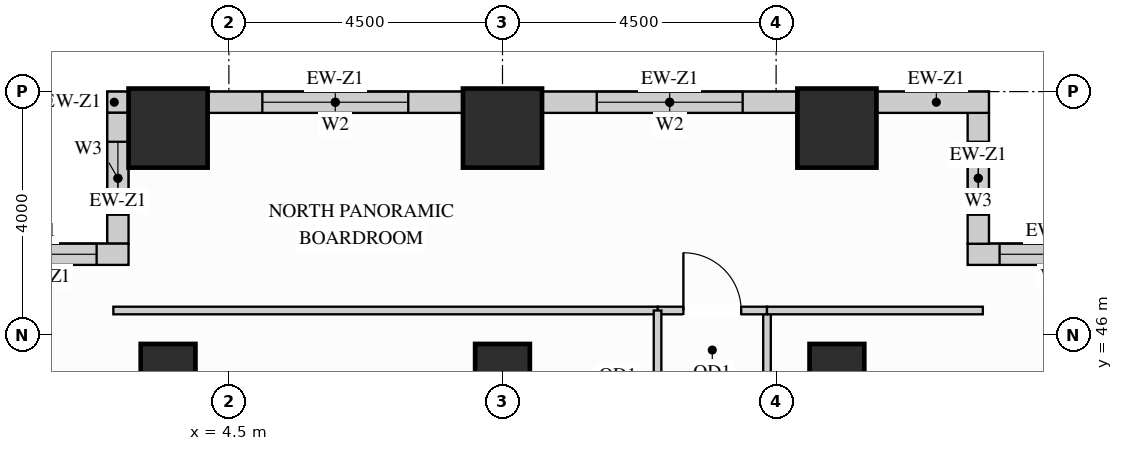
"""IFC4 building model, lengths in metres.
Left out: names, types, materials, properties, quantities, classifications, styles, units other than length and angle.
Written with IfcOpenShell. Run it as: python <this file> out.ifc"""

import sys

from ifc_helpers import new_model, si_unit, direction, frame, frame_2d, origin, origin_2d, place, context, subcontext, project, spatial, rectangle, extrude, source, transform, mapped, element, fill, save


model = new_model("IFC4")
c1 = context("Model", 3, precision=1e-05, world=origin(), true_north=direction((0.0, 1.0)))
c2 = subcontext(c1, "Body", "Model", "MODEL_VIEW")
j1 = project(units=[si_unit("LENGTHUNIT", "METRE"), si_unit("PLANEANGLEUNIT", "RADIAN")], contexts=[c1])
p1 = place(None, origin())
s1 = spatial("IfcSite", under=j1, at=p1, CompositionType="ELEMENT")
p2 = place(p1, origin())
s2 = spatial("IfcBuilding", under=s1, at=p2, CompositionType="ELEMENT")
p3 = place(p2, frame((0.0, 0.0, 47.7)))
s3 = spatial("IfcBuildingStorey", under=s2, at=p3, CompositionType="ELEMENT", Elevation=47.7)
m1 = source(origin(), c2, "Body", "SweptSolid", [
    extrude(rectangle(XDim=0.9, YDim=0.9, at=origin_2d()), origin(), (0.0, 0.0, 1.0), 3.38),
])
for number, where, z_axis, x_axis in (
    (1, (14.5, 45.4, 0.0), (0.0, 0.0, 1.0), (1.0, 0.0, 0.0)),
    (2, (3.5, 45.4, 0.0), (0.0, 0.0, 1.0), (1.0, 0.0, 0.0)),
    (3, (9.0, 45.4, 0.0), (0.0, 0.0, 1.0), (1.0, 0.0, 0.0)),
):
    element("IfcColumn", number, at=place(p3, frame(where, z_axis=z_axis, x_axis=x_axis)), inside=s3, PredefinedType="COLUMN", context=c2, shape_type="MappedRepresentation", body=[
        mapped(m1, transform((0.0, 0.0, 0.0), x_axis=(1.0, 0.0, 0.0), y_axis=(0.0, 1.0, 0.0), z_axis=(0.0, 0.0, 1.0))),
    ])
m2 = source(origin(), c2, "Body", "SweptSolid", [
    extrude(rectangle(XDim=1.3, YDim=1.3, at=origin_2d()), origin(), (0.0, 0.0, 1.0), 3.38),
])
for number, where, z_axis, x_axis in (
    (4, (14.5, 49.4, 0.0), (0.0, 0.0, 1.0), (1.0, 0.0, 0.0)),
    (5, (3.5, 49.4, 0.0), (0.0, 0.0, 1.0), (1.0, 0.0, 0.0)),
    (6, (9.0, 49.4, 0.0), (0.0, 0.0, 1.0), (1.0, 0.0, 0.0)),
):
    element("IfcColumn", number, at=place(p3, frame(where, z_axis=z_axis, x_axis=x_axis)), inside=s3, PredefinedType="COLUMN", context=c2, shape_type="MappedRepresentation", body=[
        mapped(m2, transform((0.0, 0.0, 0.0), x_axis=(1.0, 0.0, 0.0), y_axis=(0.0, 1.0, 0.0), z_axis=(0.0, 0.0, 1.0))),
    ])
p4 = place(p3, frame((19.5, 47.325, 0.0), z_axis=(0.0, 0.0, 1.0), x_axis=(-1.0, 0.0, 0.0)))
e7 = element("IfcWall", 7, at=p4, inside=s3, PredefinedType="SOLIDWALL", context=c2, shape_type="SweptSolid", body=[
    extrude(rectangle(XDim=2.85, YDim=0.35, at=frame_2d((1.425, 0.0))), origin(), (0.0, 0.0, 1.0), 3.365),
])
p5 = place(p4, frame((0.525, 0.0, 0.78)))
e8 = element("IfcOpeningElement", 8, at=p5, cuts=e7, PredefinedType="OPENING", context=c2, shape_type="SweptSolid", body=[
    extrude(rectangle(XDim=1.8, YDim=2.1, at=frame_2d((0.9, 1.05))), frame((0.0, 0.185, 0.0), z_axis=(0.0, -1.0, 0.0), x_axis=(1.0, 0.0, 0.0)), (0.0, 0.0, 1.0), 0.37),
])
p6 = place(p3, frame((16.825, 47.498, 0.0), z_axis=(0.0, 0.0, 1.0), x_axis=(0.0, 1.0, 0.0)))
e9 = element("IfcWall", 9, at=p6, inside=s3, PredefinedType="SOLIDWALL", context=c2, shape_type="SweptSolid", body=[
    extrude(rectangle(XDim=2.154, YDim=0.35, at=frame_2d((1.077, 0.0))), origin(), (0.0, 0.0, 1.0), 3.365),
])
p7 = place(p6, frame((0.477, 0.0, 0.78)))
e10 = element("IfcOpeningElement", 10, at=p7, cuts=e9, PredefinedType="OPENING", context=c2, shape_type="SweptSolid", body=[
    extrude(rectangle(XDim=1.2, YDim=2.1, at=frame_2d((0.6, 1.05))), frame((0.0, 0.185, 0.0), z_axis=(0.0, -1.0, 0.0), x_axis=(1.0, 0.0, 0.0)), (0.0, 0.0, 1.0), 0.37),
])
m3 = source(origin(), c2, "Body", "SweptSolid", [
    extrude(rectangle(XDim=1.852, YDim=0.35, at=frame_2d((0.926, 0.0))), origin(), (0.0, 0.0, 1.0), 3.365),
])
p8 = place(p3, frame((17.0, 49.825, 0.0), z_axis=(0.0, 0.0, 1.0), x_axis=(-1.0, 0.0, 0.0)))
e11 = element("IfcWall", 11, at=p8, inside=s3, PredefinedType="SOLIDWALL", context=c2, shape_type="MappedRepresentation", body=[
    mapped(m3, transform((0.0, 0.0, 0.0), x_axis=(1.0, 0.0, 0.0), y_axis=(0.0, 1.0, 0.0), z_axis=(0.0, 0.0, 1.0))),
])
p9 = place(p3, frame((13.852, 49.825, 0.0), z_axis=(0.0, 0.0, 1.0), x_axis=(-1.0, 0.0, 0.0)))
e12 = element("IfcWall", 12, at=p9, inside=s3, PredefinedType="SOLIDWALL", context=c2, shape_type="SweptSolid", body=[
    extrude(rectangle(XDim=4.204, YDim=0.35, at=frame_2d((2.102, 0.0))), origin(), (0.0, 0.0, 1.0), 2.51),
])
p10 = place(p9, frame((0.902, 0.0, 0.78)))
e13 = element("IfcOpeningElement", 13, at=p10, cuts=e12, PredefinedType="OPENING", context=c2, shape_type="SweptSolid", body=[
    extrude(rectangle(XDim=2.4, YDim=1.55, at=frame_2d((1.2, 0.775))), frame((0.0, 0.185, 0.0), z_axis=(0.0, -1.0, 0.0), x_axis=(1.0, 0.0, 0.0)), (0.0, 0.0, 1.0), 0.37),
])
p11 = place(p3, frame((8.352, 49.825, 0.0), z_axis=(0.0, 0.0, 1.0), x_axis=(-1.0, 0.0, 0.0)))
e14 = element("IfcWall", 14, at=p11, inside=s3, PredefinedType="SOLIDWALL", context=c2, shape_type="SweptSolid", body=[
    extrude(rectangle(XDim=4.204, YDim=0.35, at=frame_2d((2.102, 0.0))), origin(), (0.0, 0.0, 1.0), 2.51),
])
p12 = place(p11, frame((0.902, 0.0, 0.78)))
e15 = element("IfcOpeningElement", 15, at=p12, cuts=e14, PredefinedType="OPENING", context=c2, shape_type="SweptSolid", body=[
    extrude(rectangle(XDim=2.4, YDim=1.55, at=frame_2d((1.2, 0.775))), frame((0.0, 0.185, 0.0), z_axis=(0.0, -1.0, 0.0), x_axis=(1.0, 0.0, 0.0)), (0.0, 0.0, 1.0), 0.37),
])
m4 = source(origin(), c2, "Body", "SweptSolid", [
    extrude(rectangle(XDim=0.352, YDim=0.35, at=frame_2d((0.176, 0.0))), origin(), (0.0, 0.0, 1.0), 3.365),
])
p13 = place(p3, frame((2.852, 49.825, 0.0), z_axis=(0.0, 0.0, 1.0), x_axis=(-1.0, 0.0, 0.0)))
e16 = element("IfcWall", 16, at=p13, inside=s3, PredefinedType="SOLIDWALL", context=c2, shape_type="MappedRepresentation", body=[
    mapped(m4, transform((0.0, 0.0, 0.0), x_axis=(1.0, 0.0, 0.0), y_axis=(0.0, 1.0, 0.0), z_axis=(0.0, 0.0, 1.0))),
])
p14 = place(p3, frame((2.675, 49.652, 0.0), z_axis=(0.0, 0.0, 1.0), x_axis=(0.0, -1.0, 0.0)))
e17 = element("IfcWall", 17, at=p14, inside=s3, PredefinedType="SOLIDWALL", context=c2, shape_type="SweptSolid", body=[
    extrude(rectangle(XDim=2.154, YDim=0.35, at=frame_2d((1.077, 0.0))), origin(), (0.0, 0.0, 1.0), 3.365),
])
p15 = place(p14, frame((0.477, 0.0, 0.78)))
e18 = element("IfcOpeningElement", 18, at=p15, cuts=e17, PredefinedType="OPENING", context=c2, shape_type="SweptSolid", body=[
    extrude(rectangle(XDim=1.2, YDim=2.1, at=frame_2d((0.6, 1.05))), frame((0.0, 0.185, 0.0), z_axis=(0.0, -1.0, 0.0), x_axis=(1.0, 0.0, 0.0)), (0.0, 0.0, 1.0), 0.37),
])
p16 = place(p3, frame((2.85, 47.325, 0.0), z_axis=(0.0, 0.0, 1.0), x_axis=(-1.0, 0.0, 0.0)))
e19 = element("IfcWall", 19, at=p16, inside=s3, PredefinedType="SOLIDWALL", context=c2, shape_type="SweptSolid", body=[
    extrude(rectangle(XDim=2.85, YDim=0.35, at=frame_2d((1.425, 0.0))), origin(), (0.0, 0.0, 1.0), 3.365),
])
p17 = place(p16, frame((0.525, 0.0, 0.78)))
e20 = element("IfcOpeningElement", 20, at=p17, cuts=e19, PredefinedType="OPENING", context=c2, shape_type="SweptSolid", body=[
    extrude(rectangle(XDim=1.8, YDim=2.1, at=frame_2d((0.9, 1.05))), frame((0.0, 0.185, 0.0), z_axis=(0.0, -1.0, 0.0), x_axis=(1.0, 0.0, 0.0)), (0.0, 0.0, 1.0), 0.37),
])
p18 = place(p3, frame((13.35, 39.752, 0.0), z_axis=(0.0, 0.0, 1.0), x_axis=(0.0, 1.0, 0.0)))
e21 = element("IfcWall", 21, at=p18, inside=s3, PredefinedType="PARTITIONING", context=c2, shape_type="SweptSolid", body=[
    extrude(rectangle(XDim=6.648, YDim=0.125, at=frame_2d((3.324, 0.0))), origin(), (0.0, 0.0, 1.0), 3.365),
])
p19 = place(p18, frame((2.849, 0.0, 0.0)))
e22 = element("IfcOpeningElement", 22, at=p19, cuts=e21, PredefinedType="OPENING", context=c2, shape_type="SweptSolid", body=[
    extrude(rectangle(XDim=0.95, YDim=2.15, at=frame_2d((0.475, 1.075))), frame((0.0, 0.073, 0.0), z_axis=(0.0, -1.0, 0.0), x_axis=(1.0, 0.0, 0.0)), (0.0, 0.0, 1.0), 0.145),
])
p20 = place(p3, frame((11.55, 46.4, 0.0), z_axis=(0.0, 0.0, 1.0), x_axis=(1.0, 0.0, 0.0)))
e23 = element("IfcWall", 23, at=p20, inside=s3, PredefinedType="PARTITIONING", context=c2, shape_type="SweptSolid", body=[
    extrude(rectangle(XDim=1.8, YDim=0.125, at=frame_2d((0.9, 0.0))), origin(), (0.0, 0.0, 1.0), 3.365),
])
p21 = place(p20, frame((0.425, 0.0, 0.0)))
e24 = element("IfcOpeningElement", 24, at=p21, cuts=e23, PredefinedType="OPENING", context=c2, shape_type="SweptSolid", body=[
    extrude(rectangle(XDim=0.95, YDim=2.15, at=frame_2d((0.475, 1.075))), frame((0.0, 0.073, 0.0), z_axis=(0.0, -1.0, 0.0), x_axis=(1.0, 0.0, 0.0)), (0.0, 0.0, 1.0), 0.145),
])
m5 = source(origin(), c2, "Body", "SweptSolid", [
    extrude(rectangle(XDim=3.55, YDim=0.125, at=frame_2d((1.775, 0.0))), origin(), (0.0, 0.0, 1.0), 3.365),
])
p22 = place(p3, frame((13.35, 46.4, 0.0), z_axis=(0.0, 0.0, 1.0), x_axis=(1.0, 0.0, 0.0)))
e25 = element("IfcWall", 25, at=p22, inside=s3, PredefinedType="PARTITIONING", context=c2, shape_type="MappedRepresentation", body=[
    mapped(m5, transform((0.0, 0.0, 0.0), x_axis=(1.0, 0.0, 0.0), y_axis=(0.0, 1.0, 0.0), z_axis=(0.0, 0.0, 1.0))),
])
m6 = source(origin(), c2, "Body", "SweptSolid", [
    extrude(rectangle(XDim=8.95, YDim=0.125, at=frame_2d((4.475, 0.0))), origin(), (0.0, 0.0, 1.0), 3.365),
])
p23 = place(p3, frame((2.6, 46.4, 0.0), z_axis=(0.0, 0.0, 1.0), x_axis=(1.0, 0.0, 0.0)))
e26 = element("IfcWall", 26, at=p23, inside=s3, PredefinedType="PARTITIONING", context=c2, shape_type="MappedRepresentation", body=[
    mapped(m6, transform((0.0, 0.0, 0.0), x_axis=(1.0, 0.0, 0.0), y_axis=(0.0, 1.0, 0.0), z_axis=(0.0, 0.0, 1.0))),
])
p24 = place(p3, frame((11.55, 42.245, 0.0), z_axis=(0.0, 0.0, 1.0), x_axis=(0.0, 1.0, 0.0)))
e27 = element("IfcWall", 27, at=p24, inside=s3, PredefinedType="PARTITIONING", context=c2, shape_type="SweptSolid", body=[
    extrude(rectangle(XDim=4.155, YDim=0.125, at=frame_2d((2.077, 0.0))), origin(), (0.0, 0.0, 1.0), 3.365),
])
p25 = place(p24, frame((1.603, 0.0, 0.0)))
e28 = element("IfcOpeningElement", 28, at=p25, cuts=e27, PredefinedType="OPENING", context=c2, shape_type="SweptSolid", body=[
    extrude(rectangle(XDim=0.95, YDim=2.15, at=frame_2d((0.475, 1.075))), frame((0.0, 0.073, 0.0), z_axis=(0.0, -1.0, 0.0), x_axis=(1.0, 0.0, 0.0)), (0.0, 0.0, 1.0), 0.145),
])
m7 = source(origin(), c2, "Body", "SweptSolid", [
    extrude(rectangle(XDim=0.95, YDim=2.15, at=frame_2d((0.475, 1.075))), frame((0.0, 0.025, 0.0), z_axis=(0.0, -1.0, 0.0), x_axis=(1.0, 0.0, 0.0)), (0.0, 0.0, 1.0), 0.05),
])
p26 = place(p21, origin())
e29 = element("IfcDoor", 29, at=p26, inside=s3, OperationType="SINGLE_SWING_LEFT", PredefinedType="DOOR", context=c2, shape_type="MappedRepresentation", body=[
    mapped(m7, transform((0.0, 0.0, 0.0), x_axis=(1.0, 0.0, 0.0), y_axis=(0.0, 1.0, 0.0), z_axis=(0.0, 0.0, 1.0))),
])
fill(e24, e29)
m8 = source(origin(), c2, "Body", "SweptSolid", [
    extrude(rectangle(XDim=1.8, YDim=2.1, at=frame_2d((0.9, 1.05))), frame((0.0, 0.03, 0.0), z_axis=(0.0, -1.0, 0.0), x_axis=(1.0, 0.0, 0.0)), (0.0, 0.0, 1.0), 0.06),
])
p27 = place(p5, origin())
e30 = element("IfcWindow", 30, at=p27, inside=s3, PartitioningType="SINGLE_PANEL", PredefinedType="WINDOW", context=c2, shape_type="MappedRepresentation", body=[
    mapped(m8, transform((0.0, 0.0, 0.0), x_axis=(1.0, 0.0, 0.0), y_axis=(0.0, 1.0, 0.0), z_axis=(0.0, 0.0, 1.0))),
])
fill(e8, e30)
p28 = place(p17, origin())
e31 = element("IfcWindow", 31, at=p28, inside=s3, PartitioningType="SINGLE_PANEL", PredefinedType="WINDOW", context=c2, shape_type="MappedRepresentation", body=[
    mapped(m8, transform((0.0, 0.0, 0.0), x_axis=(1.0, 0.0, 0.0), y_axis=(0.0, 1.0, 0.0), z_axis=(0.0, 0.0, 1.0))),
])
fill(e20, e31)
m9 = source(origin(), c2, "Body", "SweptSolid", [
    extrude(rectangle(XDim=2.4, YDim=1.55, at=frame_2d((1.2, 0.775))), frame((0.0, 0.03, 0.0), z_axis=(0.0, -1.0, 0.0), x_axis=(1.0, 0.0, 0.0)), (0.0, 0.0, 1.0), 0.06),
])
p29 = place(p10, origin())
e32 = element("IfcWindow", 32, at=p29, inside=s3, PartitioningType="SINGLE_PANEL", PredefinedType="WINDOW", context=c2, shape_type="MappedRepresentation", body=[
    mapped(m9, transform((0.0, 0.0, 0.0), x_axis=(1.0, 0.0, 0.0), y_axis=(0.0, 1.0, 0.0), z_axis=(0.0, 0.0, 1.0))),
])
fill(e13, e32)
p30 = place(p12, origin())
e33 = element("IfcWindow", 33, at=p30, inside=s3, PartitioningType="SINGLE_PANEL", PredefinedType="WINDOW", context=c2, shape_type="MappedRepresentation", body=[
    mapped(m9, transform((0.0, 0.0, 0.0), x_axis=(1.0, 0.0, 0.0), y_axis=(0.0, 1.0, 0.0), z_axis=(0.0, 0.0, 1.0))),
])
fill(e15, e33)
m10 = source(origin(), c2, "Body", "SweptSolid", [
    extrude(rectangle(XDim=1.2, YDim=2.1, at=frame_2d((0.6, 1.05))), frame((0.0, 0.03, 0.0), z_axis=(0.0, -1.0, 0.0), x_axis=(1.0, 0.0, 0.0)), (0.0, 0.0, 1.0), 0.06),
])
p31 = place(p7, origin())
e34 = element("IfcWindow", 34, at=p31, inside=s3, PartitioningType="SINGLE_PANEL", PredefinedType="WINDOW", context=c2, shape_type="MappedRepresentation", body=[
    mapped(m10, transform((0.0, 0.0, 0.0), x_axis=(1.0, 0.0, 0.0), y_axis=(0.0, 1.0, 0.0), z_axis=(0.0, 0.0, 1.0))),
])
fill(e10, e34)
p32 = place(p15, origin())
e35 = element("IfcWindow", 35, at=p32, inside=s3, PartitioningType="SINGLE_PANEL", PredefinedType="WINDOW", context=c2, shape_type="MappedRepresentation", body=[
    mapped(m10, transform((0.0, 0.0, 0.0), x_axis=(1.0, 0.0, 0.0), y_axis=(0.0, 1.0, 0.0), z_axis=(0.0, 0.0, 1.0))),
])
fill(e18, e35)
save(model, sys.argv[1])
